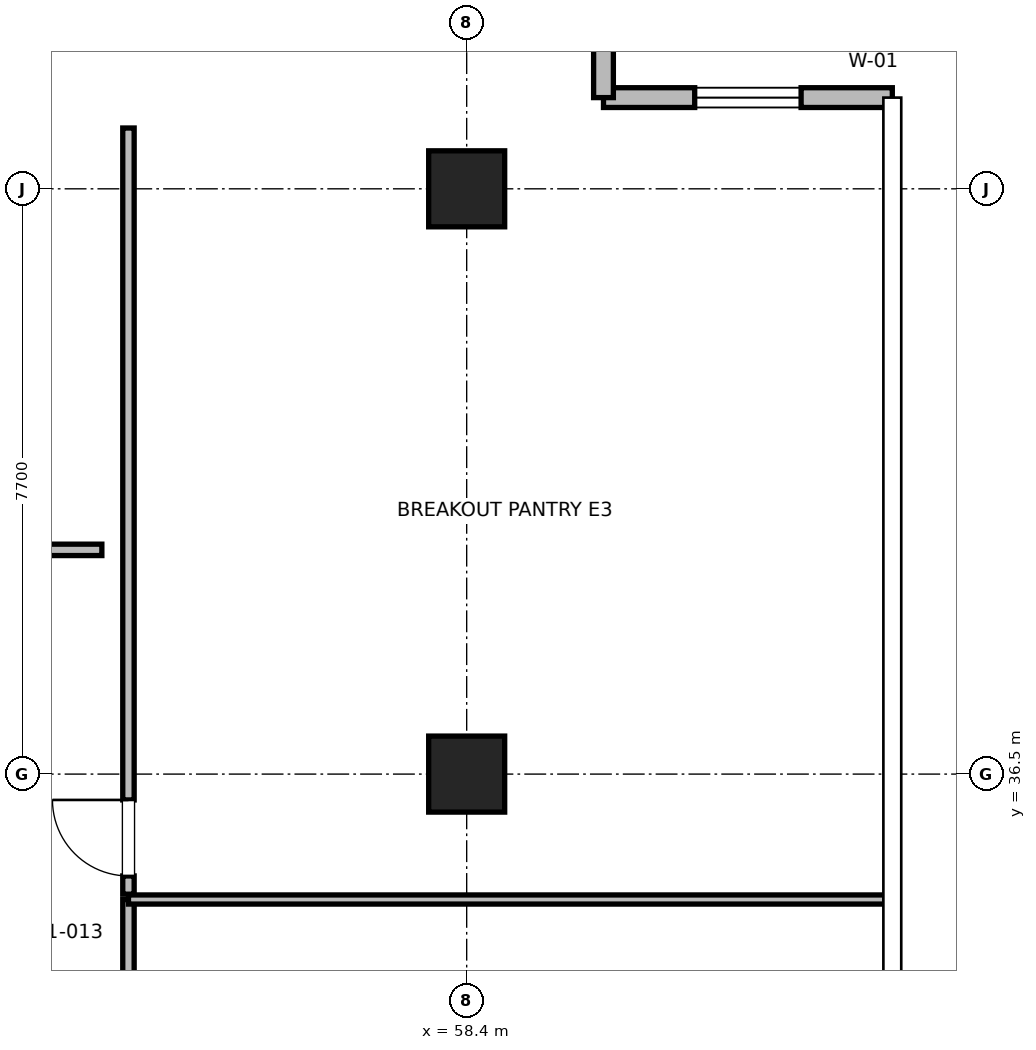
"""IFC4 building model, lengths in metres.
Left out: names, types, materials, properties, quantities, classifications, styles, units other than length and angle.
Written with IfcOpenShell. Run it as: python <this file> out.ifc"""

import sys

from ifc_helpers import new_model, si_unit, direction, frame, frame_2d, origin, origin_2d, place, context, subcontext, project, spatial, rectangle, extrude, element, fill, save


model = new_model("IFC4")
c1 = context("Model", 3, precision=1e-05, world=origin(), true_north=direction((0.0, 1.0)))
c2 = subcontext(c1, "Body", "Model", "MODEL_VIEW")
j1 = project(units=[si_unit("LENGTHUNIT", "METRE"), si_unit("PLANEANGLEUNIT", "RADIAN")], contexts=[c1])
p1 = place(None, origin())
s1 = spatial("IfcSite", under=j1, at=p1, CompositionType="ELEMENT")
p2 = place(p1, origin())
s2 = spatial("IfcBuilding", under=s1, at=p2, CompositionType="ELEMENT")
p3 = place(p2, frame((0.0, 0.0, 306.8)))
s3 = spatial("IfcBuildingStorey", under=s2, at=p3, CompositionType="ELEMENT", Elevation=306.8)
for number, where, z_axis, x_axis in (
    (1, (58.4, 36.5, 0.0), (0.0, 0.0, 1.0), (1.0, 0.0, 0.0)),
    (2, (58.4, 44.2, 0.0), (0.0, 0.0, 1.0), (1.0, 0.0, 0.0)),
):
    element("IfcColumn", number, at=place(p3, frame(where, z_axis=z_axis, x_axis=x_axis)), inside=s3, PredefinedType="COLUMN", context=c2, shape_type="SweptSolid", body=[
        extrude(rectangle(XDim=1.0, YDim=1.0, at=origin_2d()), origin(), (0.0, 0.0, 1.0), 4.0),
    ])
p4 = place(p3, frame((64.0, 45.4, 0.0), z_axis=(0.0, 0.0, 1.0), x_axis=(-1.0, 0.0, 0.0)))
e3 = element("IfcWall", 3, at=p4, inside=s3, PredefinedType="PARAPET", context=c2, shape_type="SweptSolid", body=[
    extrude(rectangle(XDim=3.8, YDim=0.26, at=frame_2d((1.9, 0.0))), origin(), (0.0, 0.0, 1.0), 3.785),
])
p5 = place(p4, frame((1.2, 0.0, 0.85)))
e4 = element("IfcOpeningElement", 4, at=p5, cuts=e3, PredefinedType="OPENING", context=c2, shape_type="SweptSolid", body=[
    extrude(rectangle(XDim=1.4, YDim=2.0, at=frame_2d((0.7, 1.0))), frame((0.0, 0.13, 0.0), z_axis=(0.0, -1.0, 0.0), x_axis=(1.0, 0.0, 0.0)), (0.0, 0.0, 1.0), 0.26),
])
p6 = place(p3, frame((60.2, 45.4, 0.0), z_axis=(0.0, 0.0, 1.0), x_axis=(0.0, 1.0, 0.0)))
e5 = element("IfcWall", 5, at=p6, inside=s3, PredefinedType="PARAPET", context=c2, shape_type="SweptSolid", body=[
    extrude(rectangle(XDim=3.3, YDim=0.26, at=frame_2d((1.65, 0.0))), origin(), (0.0, 0.0, 1.0), 3.785),
])
p7 = place(p3, frame((47.686, 39.45, 0.0), z_axis=(0.0, 0.0, 1.0), x_axis=(1.0, 0.0, 0.0)))
e6 = element("IfcWall", 6, at=p7, inside=s3, PredefinedType="PARTITIONING", context=c2, shape_type="SweptSolid", body=[
    extrude(rectangle(XDim=5.914, YDim=0.15, at=frame_2d((2.957, 0.0))), origin(), (0.0, 0.0, 1.0), 2.85),
])
p8 = place(p7, frame((2.407, 0.0, 0.0)))
e7 = element("IfcOpeningElement", 7, at=p8, cuts=e6, PredefinedType="OPENING", context=c2, shape_type="SweptSolid", body=[
    extrude(rectangle(XDim=1.0, YDim=2.15, at=frame_2d((0.5, 1.075))), frame((0.0, 0.075, 0.0), z_axis=(0.0, -1.0, 0.0), x_axis=(1.0, 0.0, 0.0)), (0.0, 0.0, 1.0), 0.15),
])
p9 = place(p3, frame((53.95, 22.67, 0.0), z_axis=(0.0, 0.0, 1.0), x_axis=(0.0, 1.0, 0.0)))
e8 = element("IfcWall", 8, at=p9, inside=s3, PredefinedType="PARTITIONING", context=c2, shape_type="SweptSolid", body=[
    extrude(rectangle(XDim=12.18, YDim=0.15, at=frame_2d((6.09, 0.0))), origin(), (0.0, 0.0, 1.0), 2.85),
])
p10 = place(p9, frame((5.555, 0.0, 0.0)))
e9 = element("IfcOpeningElement", 9, at=p10, cuts=e8, PredefinedType="OPENING", context=c2, shape_type="SweptSolid", body=[
    extrude(rectangle(XDim=1.0, YDim=2.15, at=frame_2d((0.5, 1.075))), frame((0.0, 0.075, 0.0), z_axis=(0.0, -1.0, 0.0), x_axis=(1.0, 0.0, 0.0)), (0.0, 0.0, 1.0), 0.15),
])
p11 = place(p3, frame((53.95, 34.85, 0.0), z_axis=(0.0, 0.0, 1.0), x_axis=(1.0, 0.0, 0.0)))
e10 = element("IfcWall", 10, at=p11, inside=s3, PredefinedType="PARTITIONING", context=c2, shape_type="SweptSolid", body=[
    extrude(rectangle(XDim=9.95, YDim=0.12, at=frame_2d((4.975, 0.0))), origin(), (0.0, 0.0, 1.0), 2.85),
])
p12 = place(p3, frame((53.95, 34.92, 0.0), z_axis=(0.0, 0.0, 1.0), x_axis=(0.0, 1.0, 0.0)))
e11 = element("IfcWall", 11, at=p12, inside=s3, PredefinedType="PARTITIONING", context=c2, shape_type="SweptSolid", body=[
    extrude(rectangle(XDim=10.08, YDim=0.15, at=frame_2d((5.04, 0.0))), origin(), (0.0, 0.0, 1.0), 2.85),
])
p13 = place(p12, frame((0.24, 0.0, 0.0)))
e12 = element("IfcOpeningElement", 12, at=p13, cuts=e11, PredefinedType="OPENING", context=c2, shape_type="SweptSolid", body=[
    extrude(rectangle(XDim=1.0, YDim=2.15, at=frame_2d((0.5, 1.075))), frame((0.0, 0.075, 0.0), z_axis=(0.0, -1.0, 0.0), x_axis=(1.0, 0.0, 0.0)), (0.0, 0.0, 1.0), 0.15),
])
p14 = place(p5, origin())
e13 = element("IfcWindow", 13, at=p14, inside=s3, PartitioningType="SINGLE_PANEL", PredefinedType="WINDOW", context=c2, shape_type="SweptSolid", body=[
    extrude(rectangle(XDim=1.4, YDim=2.0, at=frame_2d((0.7, 1.0))), frame((0.0, 0.03, 0.0), z_axis=(0.0, -1.0, 0.0), x_axis=(1.0, 0.0, 0.0)), (0.0, 0.0, 1.0), 0.06),
])
fill(e4, e13)
p15 = place(p13, origin())
e14 = element("IfcDoor", 14, at=p15, inside=s3, OperationType="SINGLE_SWING_RIGHT", PredefinedType="DOOR", context=c2, shape_type="SweptSolid", body=[
    extrude(rectangle(XDim=1.0, YDim=2.15, at=frame_2d((0.5, 1.075))), frame((0.0, 0.025, 0.0), z_axis=(0.0, -1.0, 0.0), x_axis=(1.0, 0.0, 0.0)), (0.0, 0.0, 1.0), 0.05),
])
fill(e12, e14)
save(model, sys.argv[1])
